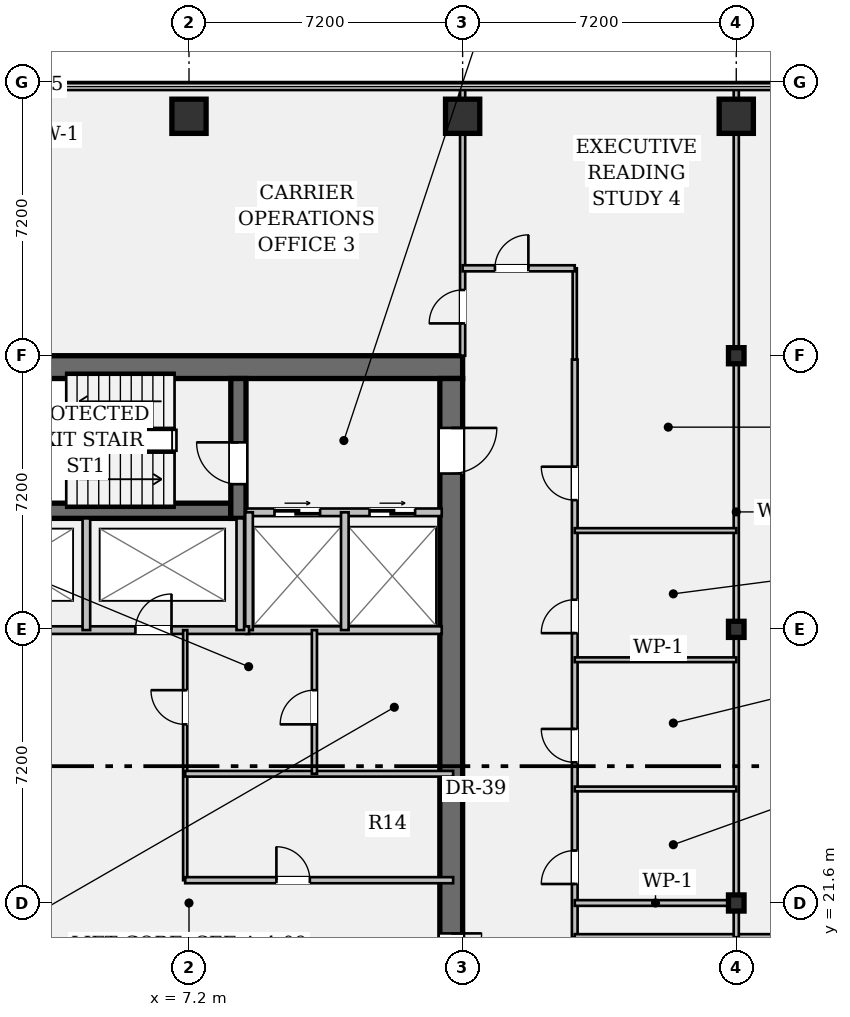
"""IFC4 building model, lengths in metres.
Left out: names, types, materials, properties, quantities, classifications, styles, units other than length and angle.
Written with IfcOpenShell. Run it as: python <this file> out.ifc"""

import sys

from ifc_helpers import new_model, si_unit, direction, frame, frame_2d, origin, origin_2d, place, context, subcontext, project, spatial, rectangle, hollow_rectangle, i_section, extrude, element, fill, save


model = new_model("IFC4")
c1 = context("Model", 3, precision=1e-05, world=origin(), true_north=direction((0.0, 1.0)))
c2 = subcontext(c1, "Body", "Model", "MODEL_VIEW")
j1 = project(units=[si_unit("LENGTHUNIT", "METRE"), si_unit("PLANEANGLEUNIT", "RADIAN")], contexts=[c1])
p1 = place(None, origin())
s1 = spatial("IfcSite", under=j1, at=p1, CompositionType="ELEMENT")
p2 = place(p1, origin())
s2 = spatial("IfcBuilding", under=s1, at=p2, CompositionType="ELEMENT")
p3 = place(p2, frame((0.0, 0.0, 136.85)))
s3 = spatial("IfcBuildingStorey", under=s2, at=p3, CompositionType="ELEMENT", Elevation=136.85)
p4 = place(p3, frame((0.6, 35.7, 0.0), z_axis=(0.0, 0.0, 1.0), x_axis=(1.0, 0.0, 0.0)))
e1 = element("IfcWall", 1, at=p4, inside=s3, PredefinedType="SHEAR", context=c2, shape_type="SweptSolid", body=[
    extrude(rectangle(XDim=13.8, YDim=0.6, at=frame_2d((6.9, 0.0))), origin(), (0.0, 0.0, 1.0), 3.58),
])
p5 = place(p3, frame((14.1, 35.4, 0.0), z_axis=(0.0, 0.0, 1.0), x_axis=(0.0, -1.0, 0.0)))
e2 = element("IfcWall", 2, at=p5, inside=s3, PredefinedType="SHEAR", context=c2, shape_type="SweptSolid", body=[
    extrude(rectangle(XDim=27.6, YDim=0.6, at=frame_2d((13.8, 0.0))), origin(), (0.0, 0.0, 1.0), 3.58),
])
p6 = place(p5, frame((1.3, 0.0, 0.0)))
e3 = element("IfcOpeningElement", 3, at=p6, cuts=e2, PredefinedType="OPENING", context=c2, shape_type="SweptSolid", body=[
    extrude(rectangle(XDim=1.2, YDim=2.15, at=frame_2d((0.6, 1.075))), frame((0.0, 0.312, 0.0), z_axis=(0.0, -1.0, 0.0), x_axis=(1.0, 0.0, 0.0)), (0.0, 0.0, 1.0), 0.624),
])
p7 = place(p5, frame((25.25, 0.0, 0.0)))
e4 = element("IfcOpeningElement", 4, at=p7, cuts=e2, PredefinedType="OPENING", context=c2, shape_type="SweptSolid", body=[
    extrude(rectangle(XDim=1.2, YDim=2.15, at=frame_2d((0.6, 1.075))), frame((0.0, 0.312, 0.0), z_axis=(0.0, -1.0, 0.0), x_axis=(1.0, 0.0, 0.0)), (0.0, 0.0, 1.0), 0.624),
])
p8 = place(p5, frame((14.6, 0.0, 0.0)))
e5 = element("IfcOpeningElement", 5, at=p8, cuts=e2, PredefinedType="OPENING", context=c2, shape_type="SweptSolid", body=[
    extrude(rectangle(XDim=1.6, YDim=2.2, at=frame_2d((0.8, 1.1))), frame((0.0, 0.312, 0.0), z_axis=(0.0, -1.0, 0.0), x_axis=(1.0, 0.0, 0.0)), (0.0, 0.0, 1.0), 0.624),
])
p9 = place(p3, frame((0.6, 31.92, 0.0), z_axis=(0.0, 0.0, 1.0), x_axis=(1.0, 0.0, 0.0)))
e6 = element("IfcWall", 6, at=p9, inside=s3, PredefinedType="SHEAR", context=c2, shape_type="SweptSolid", body=[
    extrude(rectangle(XDim=7.7, YDim=0.4, at=frame_2d((3.85, 0.0))), origin(), (0.0, 0.0, 1.0), 3.58),
])
p10 = place(p3, frame((8.5, 31.72, 0.0), z_axis=(0.0, 0.0, 1.0), x_axis=(0.0, 1.0, 0.0)))
e7 = element("IfcWall", 7, at=p10, inside=s3, PredefinedType="SHEAR", context=c2, shape_type="SweptSolid", body=[
    extrude(rectangle(XDim=3.68, YDim=0.4, at=frame_2d((1.84, 0.0))), origin(), (0.0, 0.0, 1.0), 3.58),
])
p11 = place(p10, frame((0.9, 0.0, 0.0)))
e8 = element("IfcOpeningElement", 8, at=p11, cuts=e7, PredefinedType="OPENING", context=c2, shape_type="SweptSolid", body=[
    extrude(rectangle(XDim=1.1, YDim=2.15, at=frame_2d((0.55, 1.075))), frame((0.0, 0.212, 0.0), z_axis=(0.0, -1.0, 0.0), x_axis=(1.0, 0.0, 0.0)), (0.0, 0.0, 1.0), 0.424),
])
for number, where, z_axis, x_axis in (
    (9, (7.2, 42.3, 0.0), (0.0, 0.0, 1.0), (1.0, 0.0, 0.0)),
    (10, (14.4, 42.3, 0.0), (0.0, 0.0, 1.0), (1.0, 0.0, 0.0)),
):
    element("IfcColumn", number, at=place(p3, frame(where, z_axis=z_axis, x_axis=x_axis)), inside=s3, PredefinedType="COLUMN", context=c2, shape_type="SweptSolid", body=[
        extrude(hollow_rectangle(XDim=0.9, YDim=0.9, WallThickness=0.055, at=origin_2d()), origin(), (0.0, 0.0, 1.0), 3.58),
    ])
for number, where, z_axis, x_axis in (
    (11, (21.6, 21.6, 0.0), (0.0, 0.0, 1.0), (1.0, 0.0, 0.0)),
    (12, (21.6, 28.8, 0.0), (0.0, 0.0, 1.0), (1.0, 0.0, 0.0)),
    (13, (21.6, 36.0, 0.0), (0.0, 0.0, 1.0), (1.0, 0.0, 0.0)),
):
    element("IfcColumn", number, at=place(p3, frame(where, z_axis=z_axis, x_axis=x_axis)), inside=s3, PredefinedType="COLUMN", context=c2, shape_type="SweptSolid", body=[
        extrude(i_section(OverallWidth=0.409, OverallDepth=0.424, WebThickness=0.033, FlangeThickness=0.052, FilletRadius=0.018, at=origin_2d()), origin(), (0.0, 0.0, 1.0), 3.58),
    ])
p12 = place(p3, frame((21.6, 42.3, 0.0), z_axis=(0.0, 0.0, 1.0), x_axis=(1.0, 0.0, 0.0)))
e14 = element("IfcColumn", 14, at=p12, inside=s3, PredefinedType="COLUMN", context=c2, shape_type="SweptSolid", body=[
    extrude(hollow_rectangle(XDim=0.9, YDim=0.9, WallThickness=0.055, at=origin_2d()), origin(), (0.0, 0.0, 1.0), 3.58),
])
p13 = place(p3, frame((8.7, 31.88, 0.0), z_axis=(0.0, 0.0, 1.0), x_axis=(1.0, 0.0, 0.0)))
e15 = element("IfcWall", 15, at=p13, inside=s3, PredefinedType="PARTITIONING", context=c2, shape_type="SweptSolid", body=[
    extrude(rectangle(XDim=5.15, YDim=0.2, at=frame_2d((2.575, 0.0))), origin(), (0.0, 0.0, 1.0), 3.58),
])
p14 = place(p13, frame((0.75, 0.0, 0.0)))
e16 = element("IfcOpeningElement", 16, at=p14, cuts=e15, PredefinedType="OPENING", context=c2, shape_type="SweptSolid", body=[
    extrude(rectangle(XDim=1.2, YDim=2.2, at=frame_2d((0.6, 1.1))), frame((0.0, 0.112, 0.0), z_axis=(0.0, -1.0, 0.0), x_axis=(1.0, 0.0, 0.0)), (0.0, 0.0, 1.0), 0.224),
])
p15 = place(p13, frame((3.25, 0.0, 0.0)))
e17 = element("IfcOpeningElement", 17, at=p15, cuts=e15, PredefinedType="OPENING", context=c2, shape_type="SweptSolid", body=[
    extrude(rectangle(XDim=1.2, YDim=2.2, at=frame_2d((0.6, 1.1))), frame((0.0, 0.112, 0.0), z_axis=(0.0, -1.0, 0.0), x_axis=(1.0, 0.0, 0.0)), (0.0, 0.0, 1.0), 0.224),
])
p16 = place(p3, frame((8.7, 28.78, 0.0), z_axis=(0.0, 0.0, 1.0), x_axis=(1.0, 0.0, 0.0)))
e18 = element("IfcWall", 18, at=p16, inside=s3, PredefinedType="PARTITIONING", context=c2, shape_type="SweptSolid", body=[
    extrude(rectangle(XDim=5.15, YDim=0.2, at=frame_2d((2.575, 0.0))), origin(), (0.0, 0.0, 1.0), 3.58),
])
for number, where, z_axis, x_axis in (
    (19, (8.78, 28.78, 0.0), (0.0, 0.0, 1.0), (0.0, 1.0, 0.0)),
    (20, (11.3, 28.78, 0.0), (0.0, 0.0, 1.0), (0.0, 1.0, 0.0)),
):
    element("IfcWall", number, at=place(p3, frame(where, z_axis=z_axis, x_axis=x_axis)), inside=s3, PredefinedType="PARTITIONING", context=c2, shape_type="SweptSolid", body=[
        extrude(rectangle(XDim=3.1, YDim=0.2, at=frame_2d((1.55, 0.0))), origin(), (0.0, 0.0, 1.0), 3.58),
    ])
p17 = place(p3, frame((0.6, 28.78, 0.0), z_axis=(0.0, 0.0, 1.0), x_axis=(1.0, 0.0, 0.0)))
e21 = element("IfcWall", 21, at=p17, inside=s3, PredefinedType="PARTITIONING", context=c2, shape_type="SweptSolid", body=[
    extrude(rectangle(XDim=8.18, YDim=0.2, at=frame_2d((4.09, 0.0))), origin(), (0.0, 0.0, 1.0), 3.58),
])
p18 = place(p17, frame((1.21, 0.0, 0.0)))
e22 = element("IfcOpeningElement", 22, at=p18, cuts=e21, PredefinedType="OPENING", context=c2, shape_type="SweptSolid", body=[
    extrude(rectangle(XDim=0.95, YDim=2.15, at=frame_2d((0.475, 1.075))), frame((0.0, 0.112, 0.0), z_axis=(0.0, -1.0, 0.0), x_axis=(1.0, 0.0, 0.0)), (0.0, 0.0, 1.0), 0.224),
])
p19 = place(p17, frame((5.19, 0.0, 0.0)))
e23 = element("IfcOpeningElement", 23, at=p19, cuts=e21, PredefinedType="OPENING", context=c2, shape_type="SweptSolid", body=[
    extrude(rectangle(XDim=0.95, YDim=2.15, at=frame_2d((0.475, 1.075))), frame((0.0, 0.112, 0.0), z_axis=(0.0, -1.0, 0.0), x_axis=(1.0, 0.0, 0.0)), (0.0, 0.0, 1.0), 0.224),
])
for number, where, z_axis, x_axis in (
    (24, (4.5, 28.78, 0.0), (0.0, 0.0, 1.0), (0.0, 1.0, 0.0)),
    (25, (8.55, 28.78, 0.0), (0.0, 0.0, 1.0), (0.0, 1.0, 0.0)),
):
    element("IfcWall", number, at=place(p3, frame(where, z_axis=z_axis, x_axis=x_axis)), inside=s3, PredefinedType="PARTITIONING", context=c2, shape_type="SweptSolid", body=[
        extrude(rectangle(XDim=2.94, YDim=0.2, at=frame_2d((1.47, 0.0))), origin(), (0.0, 0.0, 1.0), 3.58),
    ])
p20 = place(p3, frame((7.1, 22.2, 0.0), z_axis=(0.0, 0.0, 1.0), x_axis=(0.0, 1.0, 0.0)))
e26 = element("IfcWall", 26, at=p20, inside=s3, PredefinedType="PARTITIONING", context=c2, shape_type="SweptSolid", body=[
    extrude(rectangle(XDim=6.58, YDim=0.11, at=frame_2d((3.29, 0.0))), origin(), (0.0, 0.0, 1.0), 3.58),
])
p21 = place(p20, frame((4.1, 0.0, 0.0)))
e27 = element("IfcOpeningElement", 27, at=p21, cuts=e26, PredefinedType="OPENING", context=c2, shape_type="SweptSolid", body=[
    extrude(rectangle(XDim=0.9, YDim=2.15, at=frame_2d((0.45, 1.075))), frame((0.0, 0.067, 0.0), z_axis=(0.0, -1.0, 0.0), x_axis=(1.0, 0.0, 0.0)), (0.0, 0.0, 1.0), 0.134),
])
p22 = place(p3, frame((7.1, 22.2, 0.0), z_axis=(0.0, 0.0, 1.0), x_axis=(1.0, 0.0, 0.0)))
e28 = element("IfcWall", 28, at=p22, inside=s3, PredefinedType="PARTITIONING", context=c2, shape_type="SweptSolid", body=[
    extrude(rectangle(XDim=7.05, YDim=0.16, at=frame_2d((3.525, 0.0))), origin(), (0.0, 0.0, 1.0), 3.58),
])
p23 = place(p22, frame((2.4, 0.0, 0.0)))
e29 = element("IfcOpeningElement", 29, at=p23, cuts=e28, PredefinedType="OPENING", context=c2, shape_type="SweptSolid", body=[
    extrude(rectangle(XDim=0.88, YDim=2.15, at=frame_2d((0.44, 1.075))), frame((0.0, 0.092, 0.0), z_axis=(0.0, -1.0, 0.0), x_axis=(1.0, 0.0, 0.0)), (0.0, 0.0, 1.0), 0.184),
])
p24 = place(p3, frame((7.1, 25.0, 0.0), z_axis=(0.0, 0.0, 1.0), x_axis=(1.0, 0.0, 0.0)))
e30 = element("IfcWall", 30, at=p24, inside=s3, PredefinedType="PARTITIONING", context=c2, shape_type="SweptSolid", body=[
    extrude(rectangle(XDim=7.05, YDim=0.15, at=frame_2d((3.525, 0.0))), origin(), (0.0, 0.0, 1.0), 3.58),
])
p25 = place(p3, frame((10.5, 25.0, 0.0), z_axis=(0.0, 0.0, 1.0), x_axis=(0.0, 1.0, 0.0)))
e31 = element("IfcWall", 31, at=p25, inside=s3, PredefinedType="PARTITIONING", context=c2, shape_type="SweptSolid", body=[
    extrude(rectangle(XDim=3.78, YDim=0.135, at=frame_2d((1.89, 0.0))), origin(), (0.0, 0.0, 1.0), 3.58),
])
p26 = place(p25, frame((1.3, 0.0, 0.0)))
e32 = element("IfcOpeningElement", 32, at=p26, cuts=e31, PredefinedType="OPENING", context=c2, shape_type="SweptSolid", body=[
    extrude(rectangle(XDim=0.9, YDim=2.15, at=frame_2d((0.45, 1.075))), frame((0.0, 0.08, 0.0), z_axis=(0.0, -1.0, 0.0), x_axis=(1.0, 0.0, 0.0)), (0.0, 0.0, 1.0), 0.159),
])
p27 = place(p3, frame((17.35, 20.7, 0.0), z_axis=(0.0, 0.0, 1.0), x_axis=(0.0, 1.0, 0.0)))
e33 = element("IfcWall", 33, at=p27, inside=s3, PredefinedType="PARTITIONING", context=c2, shape_type="SweptSolid", body=[
    extrude(rectangle(XDim=15.2, YDim=0.15, at=frame_2d((7.6, 0.0))), origin(), (0.0, 0.0, 1.0), 2.869),
])
p28 = place(p27, frame((1.4, 0.0, 0.0)))
e34 = element("IfcOpeningElement", 34, at=p28, cuts=e33, PredefinedType="OPENING", context=c2, shape_type="SweptSolid", body=[
    extrude(rectangle(XDim=0.88, YDim=2.15, at=frame_2d((0.44, 1.075))), frame((0.0, 0.087, 0.0), z_axis=(0.0, -1.0, 0.0), x_axis=(1.0, 0.0, 0.0)), (0.0, 0.0, 1.0), 0.174),
])
p29 = place(p27, frame((4.6, 0.0, 0.0)))
e35 = element("IfcOpeningElement", 35, at=p29, cuts=e33, PredefinedType="OPENING", context=c2, shape_type="SweptSolid", body=[
    extrude(rectangle(XDim=0.88, YDim=2.15, at=frame_2d((0.44, 1.075))), frame((0.0, 0.087, 0.0), z_axis=(0.0, -1.0, 0.0), x_axis=(1.0, 0.0, 0.0)), (0.0, 0.0, 1.0), 0.174),
])
p30 = place(p27, frame((8.0, 0.0, 0.0)))
e36 = element("IfcOpeningElement", 36, at=p30, cuts=e33, PredefinedType="OPENING", context=c2, shape_type="SweptSolid", body=[
    extrude(rectangle(XDim=0.88, YDim=2.15, at=frame_2d((0.44, 1.075))), frame((0.0, 0.087, 0.0), z_axis=(0.0, -1.0, 0.0), x_axis=(1.0, 0.0, 0.0)), (0.0, 0.0, 1.0), 0.174),
])
p31 = place(p27, frame((11.5, 0.0, 0.0)))
e37 = element("IfcOpeningElement", 37, at=p31, cuts=e33, PredefinedType="OPENING", context=c2, shape_type="SweptSolid", body=[
    extrude(rectangle(XDim=0.88, YDim=2.15, at=frame_2d((0.44, 1.075))), frame((0.0, 0.087, 0.0), z_axis=(0.0, -1.0, 0.0), x_axis=(1.0, 0.0, 0.0)), (0.0, 0.0, 1.0), 0.174),
])
p32 = place(p3, frame((17.35, 20.7, 0.0), z_axis=(0.0, 0.0, 1.0), x_axis=(1.0, 0.0, 0.0)))
e38 = element("IfcWall", 38, at=p32, inside=s3, PredefinedType="PARTITIONING", context=c2, shape_type="SweptSolid", body=[
    extrude(rectangle(XDim=19.95, YDim=0.16, at=frame_2d((9.975, 0.0))), origin(), (0.0, 0.0, 1.0), 2.869),
])
p33 = place(p32, frame((5.52, 0.0, 0.0)))
e39 = element("IfcOpeningElement", 39, at=p33, cuts=e38, PredefinedType="OPENING", context=c2, shape_type="SweptSolid", body=[
    extrude(rectangle(XDim=1.0, YDim=2.15, at=frame_2d((0.5, 1.075))), frame((0.0, 0.092, 0.0), z_axis=(0.0, -1.0, 0.0), x_axis=(1.0, 0.0, 0.0)), (0.0, 0.0, 1.0), 0.184),
])
p34 = place(p32, frame((9.21, 0.0, 0.0)))
e40 = element("IfcOpeningElement", 40, at=p34, cuts=e38, PredefinedType="OPENING", context=c2, shape_type="SweptSolid", body=[
    extrude(rectangle(XDim=0.88, YDim=2.15, at=frame_2d((0.44, 1.075))), frame((0.0, 0.092, 0.0), z_axis=(0.0, -1.0, 0.0), x_axis=(1.0, 0.0, 0.0)), (0.0, 0.0, 1.0), 0.184),
])
p35 = place(p3, frame((17.35, 21.6, 0.0), z_axis=(0.0, 0.0, 1.0), x_axis=(1.0, 0.0, 0.0)))
e41 = element("IfcWall", 41, at=p35, inside=s3, PredefinedType="PARTITIONING", context=c2, shape_type="SweptSolid", body=[
    extrude(rectangle(XDim=4.25, YDim=0.15, at=frame_2d((2.125, 0.0))), origin(), (0.0, 0.0, 1.0), 2.869),
])
p36 = place(p3, frame((21.6, 20.7, 0.0), z_axis=(0.0, 0.0, 1.0), x_axis=(0.0, 1.0, 0.0)))
e42 = element("IfcWall", 42, at=p36, inside=s3, PredefinedType="PARTITIONING", context=c2, shape_type="SweptSolid", body=[
    extrude(rectangle(XDim=22.38, YDim=0.135, at=frame_2d((11.19, 0.0))), origin(), (0.0, 0.0, 1.0), 2.869),
])
for number, where, z_axis, x_axis in (
    (43, (17.35, 24.6, 0.0), (0.0, 0.0, 1.0), (1.0, 0.0, 0.0)),
    (44, (17.35, 28.0, 0.0), (0.0, 0.0, 1.0), (1.0, 0.0, 0.0)),
    (45, (17.35, 31.4, 0.0), (0.0, 0.0, 1.0), (1.0, 0.0, 0.0)),
):
    element("IfcWall", number, at=place(p3, frame(where, z_axis=z_axis, x_axis=x_axis)), inside=s3, PredefinedType="PARTITIONING", context=c2, shape_type="SweptSolid", body=[
        extrude(rectangle(XDim=4.25, YDim=0.125, at=frame_2d((2.125, 0.0))), origin(), (0.0, 0.0, 1.0), 2.869),
    ])
p37 = place(p3, frame((14.4, 36.0, 0.0), z_axis=(0.0, 0.0, 1.0), x_axis=(0.0, 1.0, 0.0)))
e46 = element("IfcWall", 46, at=p37, inside=s3, PredefinedType="PARTITIONING", context=c2, shape_type="SweptSolid", body=[
    extrude(rectangle(XDim=7.08, YDim=0.135, at=frame_2d((3.54, 0.0))), origin(), (0.0, 0.0, 1.0), 2.869),
])
p38 = place(p37, frame((0.85, 0.0, 0.0)))
e47 = element("IfcOpeningElement", 47, at=p38, cuts=e46, PredefinedType="OPENING", context=c2, shape_type="SweptSolid", body=[
    extrude(rectangle(XDim=0.88, YDim=2.15, at=frame_2d((0.44, 1.075))), frame((0.0, 0.08, 0.0), z_axis=(0.0, -1.0, 0.0), x_axis=(1.0, 0.0, 0.0)), (0.0, 0.0, 1.0), 0.159),
])
p39 = place(p3, frame((17.35, 35.9, 0.0), z_axis=(0.0, 0.0, 1.0), x_axis=(0.0, 1.0, 0.0)))
e48 = element("IfcWall", 48, at=p39, inside=s3, PredefinedType="PARTITIONING", context=c2, shape_type="SweptSolid", body=[
    extrude(rectangle(XDim=2.4, YDim=0.11, at=frame_2d((1.2, 0.0))), origin(), (0.0, 0.0, 1.0), 2.869),
])
p40 = place(p3, frame((14.4, 38.3, 0.0), z_axis=(0.0, 0.0, 1.0), x_axis=(1.0, 0.0, 0.0)))
e49 = element("IfcWall", 49, at=p40, inside=s3, PredefinedType="PARTITIONING", context=c2, shape_type="SweptSolid", body=[
    extrude(rectangle(XDim=2.95, YDim=0.16, at=frame_2d((1.475, 0.0))), origin(), (0.0, 0.0, 1.0), 2.869),
])
p41 = place(p40, frame((0.85, 0.0, 0.0)))
e50 = element("IfcOpeningElement", 50, at=p41, cuts=e49, PredefinedType="OPENING", context=c2, shape_type="SweptSolid", body=[
    extrude(rectangle(XDim=0.88, YDim=2.15, at=frame_2d((0.44, 1.075))), frame((0.0, 0.092, 0.0), z_axis=(0.0, -1.0, 0.0), x_axis=(1.0, 0.0, 0.0)), (0.0, 0.0, 1.0), 0.184),
])
p42 = place(p11, origin())
e51 = element("IfcDoor", 51, at=p42, inside=s3, OperationType="SINGLE_SWING_RIGHT", PredefinedType="DOOR", context=c2, shape_type="SweptSolid", body=[
    extrude(rectangle(XDim=1.1, YDim=2.15, at=frame_2d((0.55, 1.075))), frame((0.0, 0.025, 0.0), z_axis=(0.0, -1.0, 0.0), x_axis=(1.0, 0.0, 0.0)), (0.0, 0.0, 1.0), 0.05),
])
fill(e8, e51)
p43 = place(p6, origin())
e52 = element("IfcDoor", 52, at=p43, inside=s3, OperationType="SINGLE_SWING_LEFT", PredefinedType="DOOR", context=c2, shape_type="SweptSolid", body=[
    extrude(rectangle(XDim=1.2, YDim=2.15, at=frame_2d((0.6, 1.075))), frame((0.0, 0.025, 0.0), z_axis=(0.0, -1.0, 0.0), x_axis=(1.0, 0.0, 0.0)), (0.0, 0.0, 1.0), 0.05),
])
fill(e3, e52)
p44 = place(p14, origin())
e53 = element("IfcDoor", 53, at=p44, inside=s3, OperationType="DOUBLE_DOOR_SLIDING", PredefinedType="DOOR", context=c2, shape_type="SweptSolid", body=[
    extrude(rectangle(XDim=1.2, YDim=2.2, at=frame_2d((0.6, 1.1))), frame((0.0, 0.025, 0.0), z_axis=(0.0, -1.0, 0.0), x_axis=(1.0, 0.0, 0.0)), (0.0, 0.0, 1.0), 0.05),
])
fill(e16, e53)
p45 = place(p15, origin())
e54 = element("IfcDoor", 54, at=p45, inside=s3, OperationType="DOUBLE_DOOR_SLIDING", PredefinedType="DOOR", context=c2, shape_type="SweptSolid", body=[
    extrude(rectangle(XDim=1.2, YDim=2.2, at=frame_2d((0.6, 1.1))), frame((0.0, 0.025, 0.0), z_axis=(0.0, -1.0, 0.0), x_axis=(1.0, 0.0, 0.0)), (0.0, 0.0, 1.0), 0.05),
])
fill(e17, e54)
p46 = place(p19, origin())
e55 = element("IfcDoor", 55, at=p46, inside=s3, OperationType="SINGLE_SWING_RIGHT", PredefinedType="DOOR", context=c2, shape_type="SweptSolid", body=[
    extrude(rectangle(XDim=0.95, YDim=2.15, at=frame_2d((0.475, 1.075))), frame((0.0, 0.025, 0.0), z_axis=(0.0, -1.0, 0.0), x_axis=(1.0, 0.0, 0.0)), (0.0, 0.0, 1.0), 0.05),
])
fill(e23, e55)
p47 = place(p8, origin())
e56 = element("IfcDoor", 56, at=p47, inside=s3, OperationType="DOUBLE_DOOR_SINGLE_SWING", PredefinedType="DOOR", context=c2, shape_type="SweptSolid", body=[
    extrude(rectangle(XDim=1.6, YDim=2.2, at=frame_2d((0.8, 1.1))), frame((0.0, 0.025, 0.0), z_axis=(0.0, -1.0, 0.0), x_axis=(1.0, 0.0, 0.0)), (0.0, 0.0, 1.0), 0.05),
])
fill(e5, e56)
p48 = place(p23, origin())
e57 = element("IfcDoor", 57, at=p48, inside=s3, OperationType="SINGLE_SWING_LEFT", PredefinedType="DOOR", context=c2, shape_type="SweptSolid", body=[
    extrude(rectangle(XDim=0.88, YDim=2.15, at=frame_2d((0.44, 1.075))), frame((0.0, 0.025, 0.0), z_axis=(0.0, -1.0, 0.0), x_axis=(1.0, 0.0, 0.0)), (0.0, 0.0, 1.0), 0.05),
])
fill(e29, e57)
p49 = place(p21, origin())
e58 = element("IfcDoor", 58, at=p49, inside=s3, OperationType="SINGLE_SWING_RIGHT", PredefinedType="DOOR", context=c2, shape_type="SweptSolid", body=[
    extrude(rectangle(XDim=0.9, YDim=2.15, at=frame_2d((0.45, 1.075))), frame((0.0, 0.025, 0.0), z_axis=(0.0, -1.0, 0.0), x_axis=(1.0, 0.0, 0.0)), (0.0, 0.0, 1.0), 0.05),
])
fill(e27, e58)
p50 = place(p26, origin())
e59 = element("IfcDoor", 59, at=p50, inside=s3, OperationType="SINGLE_SWING_LEFT", PredefinedType="DOOR", context=c2, shape_type="SweptSolid", body=[
    extrude(rectangle(XDim=0.9, YDim=2.15, at=frame_2d((0.45, 1.075))), frame((0.0, 0.025, 0.0), z_axis=(0.0, -1.0, 0.0), x_axis=(1.0, 0.0, 0.0)), (0.0, 0.0, 1.0), 0.05),
])
fill(e32, e59)
p51 = place(p28, origin())
e60 = element("IfcDoor", 60, at=p51, inside=s3, OperationType="SINGLE_SWING_LEFT", PredefinedType="DOOR", context=c2, shape_type="SweptSolid", body=[
    extrude(rectangle(XDim=0.88, YDim=2.15, at=frame_2d((0.44, 1.075))), frame((0.0, 0.025, 0.0), z_axis=(0.0, -1.0, 0.0), x_axis=(1.0, 0.0, 0.0)), (0.0, 0.0, 1.0), 0.05),
])
fill(e34, e60)
p52 = place(p29, origin())
e61 = element("IfcDoor", 61, at=p52, inside=s3, OperationType="SINGLE_SWING_RIGHT", PredefinedType="DOOR", context=c2, shape_type="SweptSolid", body=[
    extrude(rectangle(XDim=0.88, YDim=2.15, at=frame_2d((0.44, 1.075))), frame((0.0, 0.025, 0.0), z_axis=(0.0, -1.0, 0.0), x_axis=(1.0, 0.0, 0.0)), (0.0, 0.0, 1.0), 0.05),
])
fill(e35, e61)
p53 = place(p30, origin())
e62 = element("IfcDoor", 62, at=p53, inside=s3, OperationType="SINGLE_SWING_LEFT", PredefinedType="DOOR", context=c2, shape_type="SweptSolid", body=[
    extrude(rectangle(XDim=0.88, YDim=2.15, at=frame_2d((0.44, 1.075))), frame((0.0, 0.025, 0.0), z_axis=(0.0, -1.0, 0.0), x_axis=(1.0, 0.0, 0.0)), (0.0, 0.0, 1.0), 0.05),
])
fill(e36, e62)
p54 = place(p31, origin())
e63 = element("IfcDoor", 63, at=p54, inside=s3, OperationType="SINGLE_SWING_RIGHT", PredefinedType="DOOR", context=c2, shape_type="SweptSolid", body=[
    extrude(rectangle(XDim=0.88, YDim=2.15, at=frame_2d((0.44, 1.075))), frame((0.0, 0.025, 0.0), z_axis=(0.0, -1.0, 0.0), x_axis=(1.0, 0.0, 0.0)), (0.0, 0.0, 1.0), 0.05),
])
fill(e37, e63)
p55 = place(p38, origin())
e64 = element("IfcDoor", 64, at=p55, inside=s3, OperationType="SINGLE_SWING_LEFT", PredefinedType="DOOR", context=c2, shape_type="SweptSolid", body=[
    extrude(rectangle(XDim=0.88, YDim=2.15, at=frame_2d((0.44, 1.075))), frame((0.0, 0.025, 0.0), z_axis=(0.0, -1.0, 0.0), x_axis=(1.0, 0.0, 0.0)), (0.0, 0.0, 1.0), 0.05),
])
fill(e47, e64)
p56 = place(p41, origin())
e65 = element("IfcDoor", 65, at=p56, inside=s3, OperationType="SINGLE_SWING_RIGHT", PredefinedType="DOOR", context=c2, shape_type="SweptSolid", body=[
    extrude(rectangle(XDim=0.88, YDim=2.15, at=frame_2d((0.44, 1.075))), frame((0.0, 0.025, 0.0), z_axis=(0.0, -1.0, 0.0), x_axis=(1.0, 0.0, 0.0)), (0.0, 0.0, 1.0), 0.05),
])
fill(e50, e65)
save(model, sys.argv[1])
